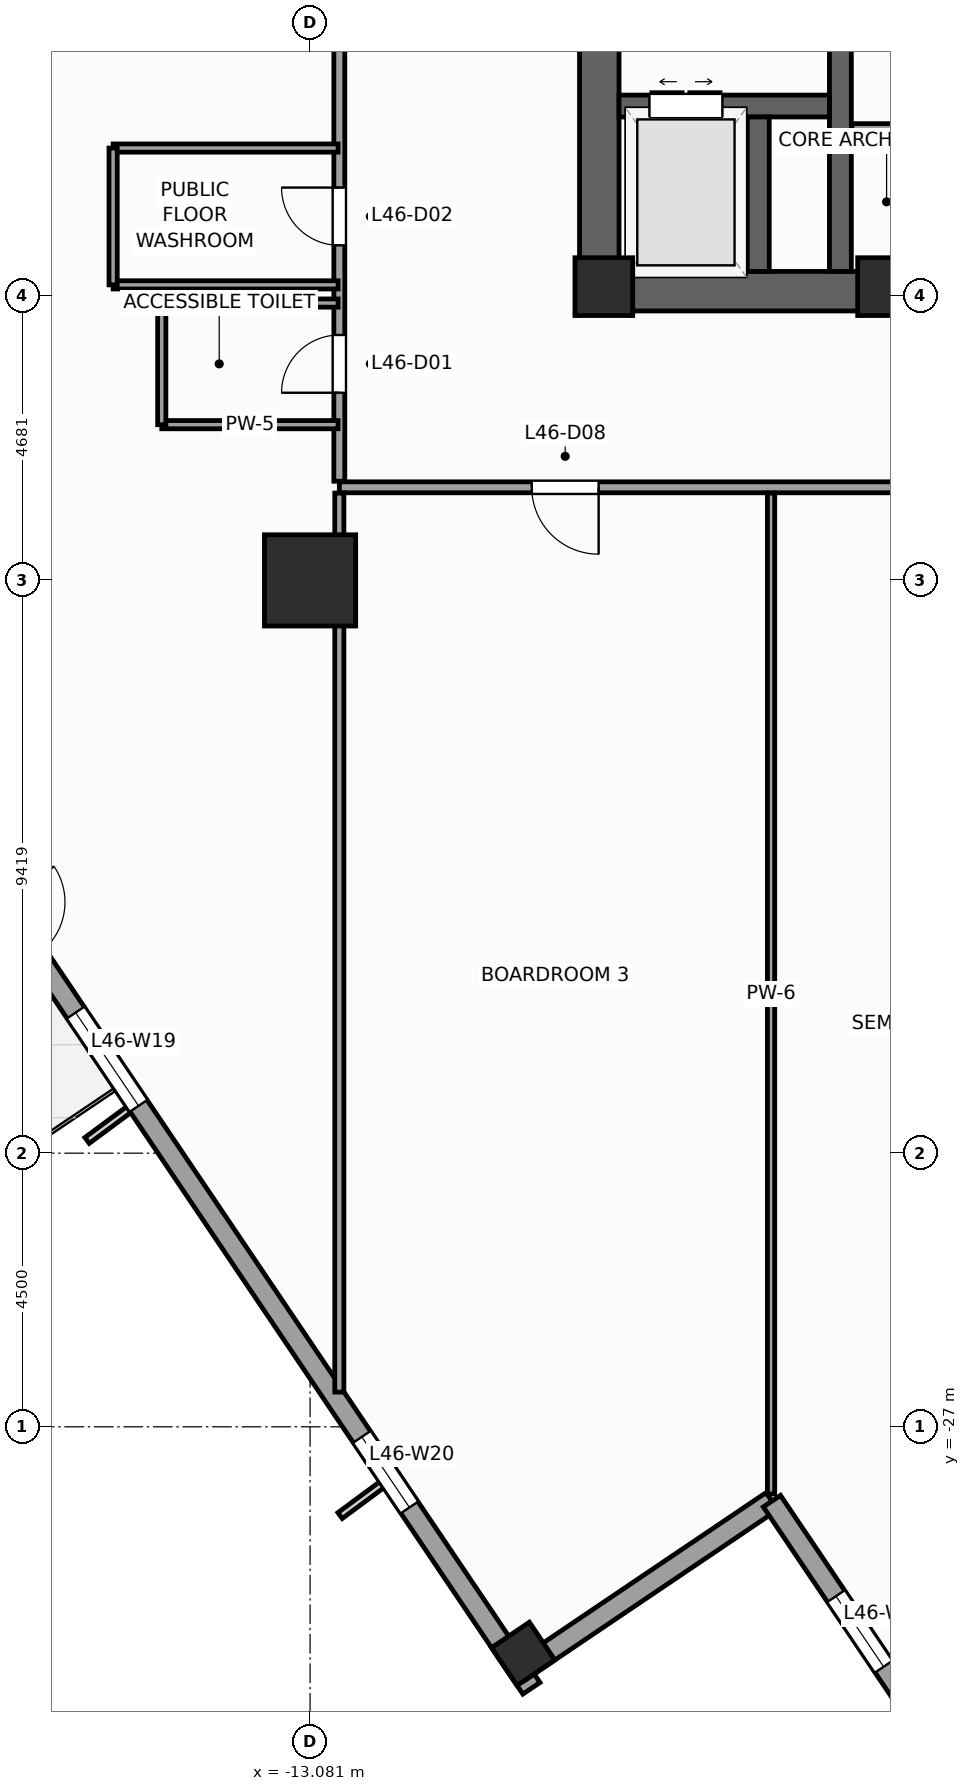
"""IFC4 building model, lengths in metres.
Left out: names, types, materials, properties, quantities, classifications, styles, units other than length and angle.
Written with IfcOpenShell. Run it as: python <this file> out.ifc"""

import sys

from ifc_helpers import new_model, si_unit, direction, frame, frame_2d, origin, origin_2d, place, context, subcontext, project, spatial, rectangle, extrude, source, transform, mapped, element, fill, save


model = new_model("IFC4")
c1 = context("Model", 3, precision=1e-05, world=origin(), true_north=direction((0.0, 1.0)))
c2 = subcontext(c1, "Body", "Model", "MODEL_VIEW")
j1 = project(units=[si_unit("LENGTHUNIT", "METRE"), si_unit("PLANEANGLEUNIT", "RADIAN")], contexts=[c1])
p1 = place(None, origin())
s1 = spatial("IfcSite", under=j1, at=p1, CompositionType="ELEMENT")
p2 = place(p1, origin())
s2 = spatial("IfcBuilding", under=s1, at=p2, CompositionType="ELEMENT")
p3 = place(p2, frame((0.0, 0.0, 192.4)))
s3 = spatial("IfcBuildingStorey", under=s2, at=p3, CompositionType="ELEMENT", Elevation=192.4)
p4 = place(p3, frame((-8.65, -8.325, 0.0), z_axis=(0.0, 0.0, 1.0), x_axis=(1.0, 0.0, 0.0)))
e1 = element("IfcWall", 1, at=p4, inside=s3, PredefinedType="SHEAR", context=c2, shape_type="SweptSolid", body=[
    extrude(rectangle(XDim=17.3, YDim=0.65, at=frame_2d((8.65, 0.0))), origin(), (0.0, 0.0, 1.0), 4.0),
])
p5 = place(p4, frame((8.0, 0.0, 0.0)))
e2 = element("IfcOpeningElement", 2, at=p5, cuts=e1, PredefinedType="OPENING", context=c2, shape_type="SweptSolid", body=[
    extrude(rectangle(XDim=1.3, YDim=2.2, at=frame_2d((0.65, 1.1))), frame((0.0, 0.335, 0.0), z_axis=(0.0, -1.0, 0.0), x_axis=(1.0, 0.0, 0.0)), (0.0, 0.0, 1.0), 0.67),
])
p6 = place(p3, frame((-8.325, -8.0, 0.0), z_axis=(0.0, 0.0, 1.0), x_axis=(0.0, 1.0, 0.0)))
e3 = element("IfcWall", 3, at=p6, inside=s3, PredefinedType="SHEAR", context=c2, shape_type="SweptSolid", body=[
    extrude(rectangle(XDim=16.0, YDim=0.65, at=frame_2d((8.0, 0.0))), origin(), (0.0, 0.0, 1.0), 4.0),
])
p7 = place(p6, frame((4.69, 0.0, 0.0)))
e4 = element("IfcOpeningElement", 4, at=p7, cuts=e3, PredefinedType="OPENING", context=c2, shape_type="SweptSolid", body=[
    extrude(rectangle(XDim=1.3, YDim=2.2, at=frame_2d((0.65, 1.1))), frame((0.0, 0.335, 0.0), z_axis=(0.0, -1.0, 0.0), x_axis=(1.0, 0.0, 0.0)), (0.0, 0.0, 1.0), 0.67),
])
p8 = place(p3, frame((-4.36, -8.0, 0.0), z_axis=(0.0, 0.0, 1.0), x_axis=(0.0, 1.0, 0.0)))
e5 = element("IfcWall", 5, at=p8, inside=s3, PredefinedType="SHEAR", context=c2, shape_type="SweptSolid", body=[
    extrude(rectangle(XDim=16.0, YDim=0.36, at=frame_2d((8.0, 0.0))), origin(), (0.0, 0.0, 1.0), 4.0),
])
p9 = place(p3, frame((-8.0, -5.28, 0.0), z_axis=(0.0, 0.0, 1.0), x_axis=(1.0, 0.0, 0.0)))
e6 = element("IfcWall", 6, at=p9, inside=s3, PredefinedType="SHEAR", context=c2, shape_type="SweptSolid", body=[
    extrude(rectangle(XDim=3.46, YDim=0.36, at=frame_2d((1.73, 0.0))), origin(), (0.0, 0.0, 1.0), 4.0),
])
p10 = place(p9, frame((0.5, 0.0, 0.0)))
e7 = element("IfcOpeningElement", 7, at=p10, cuts=e6, PredefinedType="OPENING", context=c2, shape_type="SweptSolid", body=[
    extrude(rectangle(XDim=1.2, YDim=2.25, at=frame_2d((0.6, 1.125))), frame((0.0, 0.19, 0.0), z_axis=(0.0, -1.0, 0.0), x_axis=(1.0, 0.0, 0.0)), (0.0, 0.0, 1.0), 0.38),
])
p11 = place(p3, frame((-5.71, -8.0, 0.0), z_axis=(0.0, 0.0, 1.0), x_axis=(0.0, 1.0, 0.0)))
e8 = element("IfcWall", 8, at=p11, inside=s3, PredefinedType="SHEAR", context=c2, shape_type="SweptSolid", body=[
    extrude(rectangle(XDim=2.54, YDim=0.36, at=frame_2d((1.27, 0.0))), origin(), (0.0, 0.0, 1.0), 4.0),
])
m1 = source(origin(), c2, "Body", "SweptSolid", [
    extrude(rectangle(XDim=0.95, YDim=0.95, at=origin_2d()), origin(), (0.0, 0.0, 1.0), 4.0),
])
for number, where, z_axis, x_axis in (
    (9, (-8.25, -8.25, 0.0), (0.0, 0.0, 1.0), (1.0, 0.0, 0.0)),
    (10, (-3.6, -8.25, 0.0), (0.0, 0.0, 1.0), (1.0, 0.0, 0.0)),
):
    element("IfcColumn", number, at=place(p3, frame(where, z_axis=z_axis, x_axis=x_axis)), inside=s3, PredefinedType="PILASTER", context=c2, shape_type="MappedRepresentation", body=[
        mapped(m1, transform((0.0, 0.0, 0.0), scale=1.0)),
    ])
m2 = source(origin(), c2, "Body", "SweptSolid", [
    extrude(rectangle(XDim=1.5, YDim=1.5, at=origin_2d()), origin(), (0.0, 0.0, 1.0), 4.0),
])
p12 = place(p3, frame((-13.081, -13.081, 0.0), z_axis=(0.0, 0.0, 1.0), x_axis=(1.0, 0.0, 0.0)))
e11 = element("IfcColumn", 11, at=p12, inside=s3, PredefinedType="COLUMN", context=c2, shape_type="MappedRepresentation", body=[
    mapped(m2, transform((0.0, 0.0, 0.0), scale=1.0)),
])
m3 = source(origin(), c2, "Body", "SweptSolid", [
    extrude(rectangle(XDim=0.75, YDim=0.75, at=origin_2d()), origin(), (0.0, 0.0, 1.0), 4.0),
])
p13 = place(p3, frame((-9.576, -30.734, 0.0), z_axis=(0.0, 0.0, 1.0), x_axis=(0.829037572555, 0.559192903471, 0.0)))
e12 = element("IfcColumn", 12, at=p13, inside=s3, PredefinedType="COLUMN", context=c2, shape_type="MappedRepresentation", body=[
    mapped(m3, transform((0.0, 0.0, 0.0), scale=1.0)),
])
p14 = place(p3, frame((-32.558, 2.972, 0.0), z_axis=(0.0, 0.0, 1.0), x_axis=(0.559194910251, -0.829036218961, 0.0)))
e13 = element("IfcWall", 13, at=p14, inside=s3, PredefinedType="STANDARD", context=c2, shape_type="SweptSolid", body=[
    extrude(rectangle(XDim=41.34, YDim=0.34, at=frame_2d((20.67, 0.0))), origin(), (0.0, 0.0, 1.0), 3.04),
])
p15 = place(p14, frame((25.745, 0.0, 0.0)))
e14 = element("IfcOpeningElement", 14, at=p15, cuts=e13, PredefinedType="OPENING", context=c2, shape_type="SweptSolid", body=[
    extrude(rectangle(XDim=1.05, YDim=2.25, at=frame_2d((0.525, 1.125))), frame((0.0, 0.18, 0.0), z_axis=(0.0, -1.0, 0.0), x_axis=(1.0, 0.0, 0.0)), (0.0, 0.0, 1.0), 0.36),
])
p16 = place(p14, frame((5.761, 0.0, 0.56)))
e15 = element("IfcOpeningElement", 15, at=p16, cuts=e13, PredefinedType="OPENING", context=c2, shape_type="SweptSolid", body=[
    extrude(rectangle(XDim=1.4, YDim=2.4, at=frame_2d((0.7, 1.2))), frame((0.0, 0.18, 0.0), z_axis=(0.0, -1.0, 0.0), x_axis=(1.0, 0.0, 0.0)), (0.0, 0.0, 1.0), 0.36),
])
p17 = place(p14, frame((11.064, 0.0, 0.61)))
e16 = element("IfcOpeningElement", 16, at=p17, cuts=e13, PredefinedType="OPENING", context=c2, shape_type="SweptSolid", body=[
    extrude(rectangle(XDim=1.85, YDim=2.35, at=frame_2d((0.925, 1.175))), frame((0.0, 0.18, 0.0), z_axis=(0.0, -1.0, 0.0), x_axis=(1.0, 0.0, 0.0)), (0.0, 0.0, 1.0), 0.36),
])
p18 = place(p14, frame((18.168, 0.0, 0.61)))
e17 = element("IfcOpeningElement", 17, at=p18, cuts=e13, PredefinedType="OPENING", context=c2, shape_type="SweptSolid", body=[
    extrude(rectangle(XDim=1.85, YDim=2.35, at=frame_2d((0.925, 1.175))), frame((0.0, 0.18, 0.0), z_axis=(0.0, -1.0, 0.0), x_axis=(1.0, 0.0, 0.0)), (0.0, 0.0, 1.0), 0.36),
])
p19 = place(p14, frame((27.936, 0.0, 0.61)))
e18 = element("IfcOpeningElement", 18, at=p19, cuts=e13, PredefinedType="OPENING", context=c2, shape_type="SweptSolid", body=[
    extrude(rectangle(XDim=1.85, YDim=2.35, at=frame_2d((0.925, 1.175))), frame((0.0, 0.18, 0.0), z_axis=(0.0, -1.0, 0.0), x_axis=(1.0, 0.0, 0.0)), (0.0, 0.0, 1.0), 0.36),
])
p20 = place(p14, frame((36.352, 0.0, 0.56)))
e19 = element("IfcOpeningElement", 19, at=p20, cuts=e13, PredefinedType="OPENING", context=c2, shape_type="SweptSolid", body=[
    extrude(rectangle(XDim=1.4, YDim=2.4, at=frame_2d((0.7, 1.2))), frame((0.0, 0.18, 0.0), z_axis=(0.0, -1.0, 0.0), x_axis=(1.0, 0.0, 0.0)), (0.0, 0.0, 1.0), 0.36),
])
p21 = place(p3, frame((-9.631, -31.019, 0.0), z_axis=(0.0, 0.0, 1.0), x_axis=(0.829025804298, 0.559210350234, 0.0)))
e20 = element("IfcWall", 20, at=p21, inside=s3, PredefinedType="STANDARD", context=c2, shape_type="SweptSolid", body=[
    extrude(rectangle(XDim=5.0, YDim=0.34, at=frame_2d((2.5, 0.0))), origin(), (0.0, 0.0, 1.0), 3.74),
])
p22 = place(p3, frame((-5.486, -28.223, 0.0), z_axis=(0.0, 0.0, 1.0), x_axis=(0.559171107879, -0.82905227345, 0.0)))
e21 = element("IfcWall", 21, at=p22, inside=s3, PredefinedType="STANDARD", context=c2, shape_type="SweptSolid", body=[
    extrude(rectangle(XDim=5.17, YDim=0.34, at=frame_2d((2.585, 0.0))), origin(), (0.0, 0.0, 1.0), 3.04),
])
p23 = place(p22, frame((1.885, 0.0, 0.56)))
e22 = element("IfcOpeningElement", 22, at=p23, cuts=e21, PredefinedType="OPENING", context=c2, shape_type="SweptSolid", body=[
    extrude(rectangle(XDim=1.4, YDim=2.4, at=frame_2d((0.7, 1.2))), frame((0.0, 0.18, 0.0), z_axis=(0.0, -1.0, 0.0), x_axis=(1.0, 0.0, 0.0)), (0.0, 0.0, 1.0), 0.36),
])
p24 = place(p3, frame((-4.17, -5.65, 0.0), z_axis=(0.0, 0.0, 1.0), x_axis=(1.0, 0.0, 0.0)))
e23 = element("IfcWall", 23, at=p24, inside=s3, PredefinedType="PARTITIONING", context=c2, shape_type="SweptSolid", body=[
    extrude(rectangle(XDim=2.28, YDim=0.16, at=frame_2d((1.14, 0.0))), origin(), (0.0, 0.0, 1.0), 3.74),
])
p25 = place(p3, frame((-12.6, -11.55, 0.0), z_axis=(0.0, 0.0, 1.0), x_axis=(1.0, 0.0, 0.0)))
e24 = element("IfcWall", 24, at=p25, inside=s3, PredefinedType="PARTITIONING", context=c2, shape_type="SweptSolid", body=[
    extrude(rectangle(XDim=25.2, YDim=0.18, at=frame_2d((12.6, 0.0))), origin(), (0.0, 0.0, 1.0), 3.74),
])
p26 = place(p25, frame((3.165, 0.0, 0.0)))
e25 = element("IfcOpeningElement", 25, at=p26, cuts=e24, PredefinedType="OPENING", context=c2, shape_type="SweptSolid", body=[
    extrude(rectangle(XDim=1.1, YDim=2.2, at=frame_2d((0.55, 1.1))), frame((0.0, 0.1, 0.0), z_axis=(0.0, -1.0, 0.0), x_axis=(1.0, 0.0, 0.0)), (0.0, 0.0, 1.0), 0.2),
])
p27 = place(p25, frame((9.3, 0.0, 0.0)))
e26 = element("IfcOpeningElement", 26, at=p27, cuts=e24, PredefinedType="OPENING", context=c2, shape_type="SweptSolid", body=[
    extrude(rectangle(XDim=1.1, YDim=2.2, at=frame_2d((0.55, 1.1))), frame((0.0, 0.1, 0.0), z_axis=(0.0, -1.0, 0.0), x_axis=(1.0, 0.0, 0.0)), (0.0, 0.0, 1.0), 0.2),
])
p28 = place(p25, frame((14.8, 0.0, 0.0)))
e27 = element("IfcOpeningElement", 27, at=p28, cuts=e24, PredefinedType="OPENING", context=c2, shape_type="SweptSolid", body=[
    extrude(rectangle(XDim=1.1, YDim=2.2, at=frame_2d((0.55, 1.1))), frame((0.0, 0.1, 0.0), z_axis=(0.0, -1.0, 0.0), x_axis=(1.0, 0.0, 0.0)), (0.0, 0.0, 1.0), 0.2),
])
p29 = place(p25, frame((20.936, 0.0, 0.0)))
e28 = element("IfcOpeningElement", 28, at=p29, cuts=e24, PredefinedType="OPENING", context=c2, shape_type="SweptSolid", body=[
    extrude(rectangle(XDim=1.1, YDim=2.2, at=frame_2d((0.55, 1.1))), frame((0.0, 0.1, 0.0), z_axis=(0.0, -1.0, 0.0), x_axis=(1.0, 0.0, 0.0)), (0.0, 0.0, 1.0), 0.2),
])
p30 = place(p3, frame((-12.6, -11.45, 0.0), z_axis=(0.0, 0.0, 1.0), x_axis=(0.0, 1.0, 0.0)))
e29 = element("IfcWall", 29, at=p30, inside=s3, PredefinedType="PARTITIONING", context=c2, shape_type="SweptSolid", body=[
    extrude(rectangle(XDim=13.05, YDim=0.18, at=frame_2d((6.525, 0.0))), origin(), (0.0, 0.0, 1.0), 3.74),
])
p31 = place(p30, frame((1.455, 0.0, 0.0)))
e30 = element("IfcOpeningElement", 30, at=p31, cuts=e29, PredefinedType="OPENING", context=c2, shape_type="SweptSolid", body=[
    extrude(rectangle(XDim=0.95, YDim=2.1, at=frame_2d((0.475, 1.05))), frame((0.0, 0.1, 0.0), z_axis=(0.0, -1.0, 0.0), x_axis=(1.0, 0.0, 0.0)), (0.0, 0.0, 1.0), 0.2),
])
p32 = place(p30, frame((3.879, 0.0, 0.0)))
e31 = element("IfcOpeningElement", 31, at=p32, cuts=e29, PredefinedType="OPENING", context=c2, shape_type="SweptSolid", body=[
    extrude(rectangle(XDim=0.95, YDim=2.1, at=frame_2d((0.475, 1.05))), frame((0.0, 0.1, 0.0), z_axis=(0.0, -1.0, 0.0), x_axis=(1.0, 0.0, 0.0)), (0.0, 0.0, 1.0), 0.2),
])
p33 = place(p30, frame((11.01, 0.0, 0.0)))
e32 = element("IfcOpeningElement", 32, at=p33, cuts=e29, PredefinedType="OPENING", context=c2, shape_type="SweptSolid", body=[
    extrude(rectangle(XDim=1.1, YDim=2.2, at=frame_2d((0.55, 1.1))), frame((0.0, 0.1, 0.0), z_axis=(0.0, -1.0, 0.0), x_axis=(1.0, 0.0, 0.0)), (0.0, 0.0, 1.0), 0.2),
])
p34 = place(p30, frame((7.384, 0.0, 0.0)))
e33 = element("IfcOpeningElement", 33, at=p34, cuts=e29, PredefinedType="OPENING", context=c2, shape_type="SweptSolid", body=[
    extrude(rectangle(XDim=1.1, YDim=2.2, at=frame_2d((0.55, 1.1))), frame((0.0, 0.1, 0.0), z_axis=(0.0, -1.0, 0.0), x_axis=(1.0, 0.0, 0.0)), (0.0, 0.0, 1.0), 0.2),
])
p35 = place(p3, frame((-12.6, -26.429, 0.0), z_axis=(0.0, 0.0, 1.0), x_axis=(0.0, 1.0, 0.0)))
e34 = element("IfcWall", 34, at=p35, inside=s3, PredefinedType="PARTITIONING", context=c2, shape_type="SweptSolid", body=[
    extrude(rectangle(XDim=14.784, YDim=0.15, at=frame_2d((7.392, 0.0))), origin(), (0.0, 0.0, 1.0), 3.04),
])
p36 = place(p3, frame((-5.5, -28.105, 0.0), z_axis=(0.0, 0.0, 1.0), x_axis=(0.0, 1.0, 0.0)))
e35 = element("IfcWall", 35, at=p36, inside=s3, PredefinedType="PARTITIONING", context=c2, shape_type="SweptSolid", body=[
    extrude(rectangle(XDim=16.46, YDim=0.12, at=frame_2d((8.23, 0.0))), origin(), (0.0, 0.0, 1.0), 3.74),
])
for number, where, z_axis, x_axis in (
    (36, (-15.52, -10.52, 0.0), (0.0, 0.0, 1.0), (1.0, 0.0, 0.0)),
    (37, (-15.52, -8.52, 0.0), (0.0, 0.0, 1.0), (1.0, 0.0, 0.0)),
):
    element("IfcWall", number, at=place(p3, frame(where, z_axis=z_axis, x_axis=x_axis)), inside=s3, PredefinedType="PARTITIONING", context=c2, shape_type="SweptSolid", body=[
        extrude(rectangle(XDim=2.9, YDim=0.135, at=frame_2d((1.45, 0.0))), origin(), (0.0, 0.0, 1.0), 3.74),
    ])
p37 = place(p3, frame((-15.52, -10.52, 0.0), z_axis=(0.0, 0.0, 1.0), x_axis=(0.0, 1.0, 0.0)))
e38 = element("IfcWall", 38, at=p37, inside=s3, PredefinedType="PARTITIONING", context=c2, shape_type="SweptSolid", body=[
    extrude(rectangle(XDim=2.0, YDim=0.135, at=frame_2d((1.0, 0.0))), origin(), (0.0, 0.0, 1.0), 3.74),
])
for number, where, z_axis, x_axis in (
    (39, (-16.32, -8.221, 0.0), (0.0, 0.0, 1.0), (1.0, 0.0, 0.0)),
    (40, (-16.32, -5.971, 0.0), (0.0, 0.0, 1.0), (1.0, 0.0, 0.0)),
):
    element("IfcWall", number, at=place(p3, frame(where, z_axis=z_axis, x_axis=x_axis)), inside=s3, PredefinedType="PARTITIONING", context=c2, shape_type="SweptSolid", body=[
        extrude(rectangle(XDim=3.7, YDim=0.135, at=frame_2d((1.85, 0.0))), origin(), (0.0, 0.0, 1.0), 3.74),
    ])
p38 = place(p3, frame((-16.32, -8.221, 0.0), z_axis=(0.0, 0.0, 1.0), x_axis=(0.0, 1.0, 0.0)))
e41 = element("IfcWall", 41, at=p38, inside=s3, PredefinedType="PARTITIONING", context=c2, shape_type="SweptSolid", body=[
    extrude(rectangle(XDim=2.25, YDim=0.135, at=frame_2d((1.125, 0.0))), origin(), (0.0, 0.0, 1.0), 3.74),
])
m4 = source(origin(), c2, "Body", "SweptSolid", [
    extrude(rectangle(XDim=1.85, YDim=2.35, at=frame_2d((0.925, 1.175))), frame((0.0, 0.03, 0.0), z_axis=(0.0, -1.0, 0.0), x_axis=(1.0, 0.0, 0.0)), (0.0, 0.0, 1.0), 0.06),
])
p39 = place(p19, origin())
e42 = element("IfcWindow", 42, at=p39, inside=s3, PartitioningType="SINGLE_PANEL", PredefinedType="WINDOW", context=c2, shape_type="MappedRepresentation", body=[
    mapped(m4, transform((0.0, 0.0, 0.0), scale=1.0)),
])
fill(e18, e42)
m5 = source(origin(), c2, "Body", "SweptSolid", [
    extrude(rectangle(XDim=1.4, YDim=2.4, at=frame_2d((0.7, 1.2))), frame((0.0, 0.03, 0.0), z_axis=(0.0, -1.0, 0.0), x_axis=(1.0, 0.0, 0.0)), (0.0, 0.0, 1.0), 0.06),
])
p40 = place(p20, origin())
e43 = element("IfcWindow", 43, at=p40, inside=s3, PartitioningType="SINGLE_PANEL", PredefinedType="WINDOW", context=c2, shape_type="MappedRepresentation", body=[
    mapped(m5, transform((0.0, 0.0, 0.0), scale=1.0)),
])
fill(e19, e43)
p41 = place(p23, origin())
e44 = element("IfcWindow", 44, at=p41, inside=s3, PartitioningType="SINGLE_PANEL", PredefinedType="WINDOW", context=c2, shape_type="MappedRepresentation", body=[
    mapped(m5, transform((0.0, 0.0, 0.0), scale=1.0)),
])
fill(e22, e44)
m6 = source(origin(), c2, "Body", "SweptSolid", [
    extrude(rectangle(XDim=1.2, YDim=2.25, at=frame_2d((0.6, 1.125))), frame((0.0, 0.025, 0.0), z_axis=(0.0, -1.0, 0.0), x_axis=(1.0, 0.0, 0.0)), (0.0, 0.0, 1.0), 0.05),
])
p42 = place(p10, origin())
e45 = element("IfcDoor", 45, at=p42, inside=s3, OperationType="DOUBLE_DOOR_SLIDING", PredefinedType="DOOR", context=c2, shape_type="MappedRepresentation", body=[
    mapped(m6, transform((0.0, 0.0, 0.0), scale=1.0)),
])
fill(e7, e45)
m7 = source(origin(), c2, "Body", "SweptSolid", [
    extrude(rectangle(XDim=0.95, YDim=2.1, at=frame_2d((0.475, 1.05))), frame((0.0, 0.025, 0.0), z_axis=(0.0, -1.0, 0.0), x_axis=(1.0, 0.0, 0.0)), (0.0, 0.0, 1.0), 0.05),
])
p43 = place(p31, origin())
e46 = element("IfcDoor", 46, at=p43, inside=s3, OperationType="SINGLE_SWING_LEFT", PredefinedType="DOOR", context=c2, shape_type="MappedRepresentation", body=[
    mapped(m7, transform((0.0, 0.0, 0.0), scale=1.0)),
])
fill(e30, e46)
p44 = place(p32, origin())
e47 = element("IfcDoor", 47, at=p44, inside=s3, OperationType="SINGLE_SWING_RIGHT", PredefinedType="DOOR", context=c2, shape_type="MappedRepresentation", body=[
    mapped(m7, transform((0.0, 0.0, 0.0), scale=1.0)),
])
fill(e31, e47)
m8 = source(origin(), c2, "Body", "SweptSolid", [
    extrude(rectangle(XDim=1.1, YDim=2.2, at=frame_2d((0.55, 1.1))), frame((0.0, 0.025, 0.0), z_axis=(0.0, -1.0, 0.0), x_axis=(1.0, 0.0, 0.0)), (0.0, 0.0, 1.0), 0.05),
])
p45 = place(p26, frame((1.1, 0.0, 0.0), z_axis=(0.0, 0.0, 1.0), x_axis=(-1.0, 0.0, 0.0)))
e48 = element("IfcDoor", 48, at=p45, inside=s3, OperationType="SINGLE_SWING_RIGHT", PredefinedType="DOOR", context=c2, shape_type="MappedRepresentation", body=[
    mapped(m8, transform((0.0, 0.0, 0.0), scale=1.0)),
])
fill(e25, e48)
save(model, sys.argv[1])
